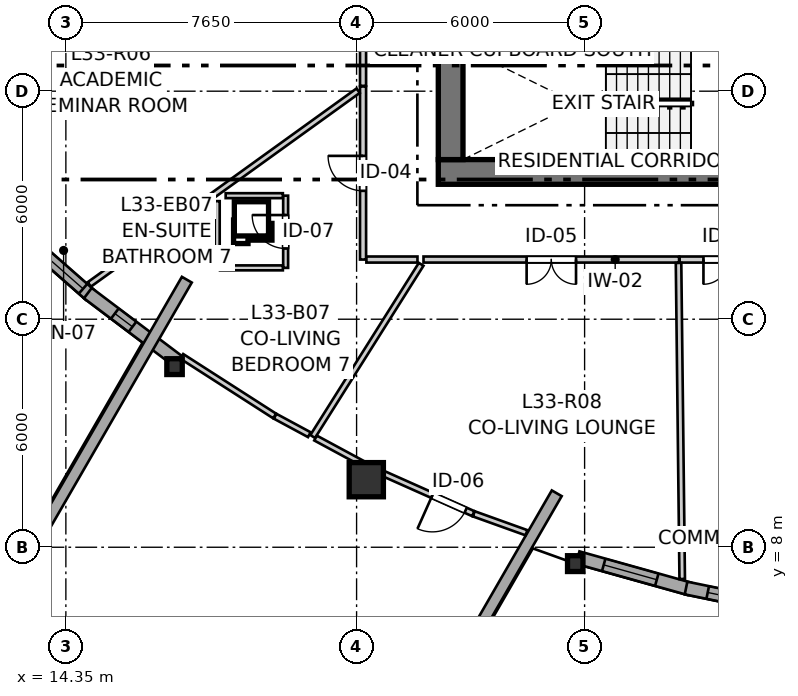
"""IFC4 building model, lengths in metres.
Left out: names, types, materials, properties, quantities, classifications, styles, units other than length and angle.
Written with IfcOpenShell. Run it as: python <this file> out.ifc"""

import sys

from ifc_helpers import new_model, si_unit, direction, frame, frame_2d, origin, origin_2d, place, context, subcontext, project, spatial, rectangle, i_section, extrude, source, transform, mapped, element, fill, save


model = new_model("IFC4")
c1 = context("Model", 3, precision=1e-05, world=origin(), true_north=direction((0.0, 1.0)))
c2 = subcontext(c1, "Body", "Model", "MODEL_VIEW")
j1 = project(units=[si_unit("LENGTHUNIT", "METRE"), si_unit("PLANEANGLEUNIT", "RADIAN")], contexts=[c1])
p1 = place(None, origin())
s1 = spatial("IfcSite", under=j1, at=p1, CompositionType="ELEMENT")
p2 = place(p1, origin())
s2 = spatial("IfcBuilding", under=s1, at=p2, CompositionType="ELEMENT")
p3 = place(p2, frame((0.0, 0.0, 112.0)))
s3 = spatial("IfcBuildingStorey", under=s2, at=p3, CompositionType="ELEMENT", Elevation=112.0)
p4 = place(p3, frame((24.15, 17.875, 0.0), z_axis=(0.0, 0.0, 1.0), x_axis=(1.0, 0.0, 0.0)))
e1 = element("IfcWall", 1, at=p4, inside=s3, PredefinedType="SHEAR", context=c2, shape_type="SweptSolid", body=[
    extrude(rectangle(XDim=12.4, YDim=0.65, at=frame_2d((6.2, 0.0))), origin(), (0.0, 0.0, 1.0), 2.935),
])
p5 = place(p3, frame((24.475, 33.8, 0.0), z_axis=(0.0, 0.0, 1.0), x_axis=(0.0, -1.0, 0.0)))
e2 = element("IfcWall", 2, at=p5, inside=s3, PredefinedType="SHEAR", context=c2, shape_type="SweptSolid", body=[
    extrude(rectangle(XDim=15.6, YDim=0.65, at=frame_2d((7.8, 0.0))), origin(), (0.0, 0.0, 1.0), 2.935),
])
p6 = place(p5, frame((7.05, 0.0, 0.0)))
e3 = element("IfcOpeningElement", 3, at=p6, cuts=e2, PredefinedType="OPENING", context=c2, shape_type="SweptSolid", body=[
    extrude(rectangle(XDim=1.5, YDim=2.15, at=frame_2d((0.75, 1.075))), frame((0.0, 0.335, 0.0), z_axis=(0.0, -1.0, 0.0), x_axis=(1.0, 0.0, 0.0)), (0.0, 0.0, 1.0), 0.67),
])
p7 = place(p5, frame((3.52, 0.0, 0.0)))
e4 = element("IfcOpeningElement", 4, at=p7, cuts=e2, PredefinedType="OPENING", context=c2, shape_type="SweptSolid", body=[
    extrude(rectangle(XDim=0.86, YDim=2.05, at=frame_2d((0.43, 1.025))), frame((0.0, 0.335, 0.0), z_axis=(0.0, -1.0, 0.0), x_axis=(1.0, 0.0, 0.0)), (0.0, 0.0, 1.0), 0.67),
])
p8 = place(p5, frame((11.22, 0.0, 0.0)))
e5 = element("IfcOpeningElement", 5, at=p8, cuts=e2, PredefinedType="OPENING", context=c2, shape_type="SweptSolid", body=[
    extrude(rectangle(XDim=0.86, YDim=2.05, at=frame_2d((0.43, 1.025))), frame((0.0, 0.335, 0.0), z_axis=(0.0, -1.0, 0.0), x_axis=(1.0, 0.0, 0.0)), (0.0, 0.0, 1.0), 0.67),
])
m1 = source(origin(), c2, "Body", "SweptSolid", [
    extrude(i_section(OverallWidth=0.406, OverallDepth=0.416, WebThickness=0.027, FlangeThickness=0.044, FilletRadius=0.015, at=origin_2d()), origin(), (0.0, 0.0, 1.0), 2.935),
])
p9 = place(p3, frame((17.209, 12.753, 0.0), z_axis=(0.0, 0.0, 1.0), x_axis=(1.0, 0.0, 0.0)))
e6 = element("IfcColumn", 6, at=p9, inside=s3, PredefinedType="PILASTER", context=c2, shape_type="MappedRepresentation", body=[
    mapped(m1, transform((0.0, 0.0, 0.0), x_axis=(1.0, 0.0, 0.0), y_axis=(0.0, 1.0, 0.0), z_axis=(0.0, 0.0, 1.0), scale=1.0)),
])
m2 = source(origin(), c2, "Body", "SweptSolid", [
    extrude(rectangle(XDim=0.9, YDim=0.9, at=origin_2d()), origin(), (0.0, 0.0, 1.0), 2.935),
])
p10 = place(p3, frame((22.256, 9.778, 0.0), z_axis=(0.0, 0.0, 1.0), x_axis=(1.0, 0.0, 0.0)))
e7 = element("IfcColumn", 7, at=p10, inside=s3, PredefinedType="COLUMN", context=c2, shape_type="MappedRepresentation", body=[
    mapped(m2, transform((0.0, 0.0, 0.0), x_axis=(1.0, 0.0, 0.0), y_axis=(0.0, 1.0, 0.0), z_axis=(0.0, 0.0, 1.0), scale=1.0)),
])
p11 = place(p3, frame((27.754, 7.569, 0.0), z_axis=(0.0, 0.0, 1.0), x_axis=(1.0, 0.0, 0.0)))
e8 = element("IfcColumn", 8, at=p11, inside=s3, PredefinedType="PILASTER", context=c2, shape_type="MappedRepresentation", body=[
    mapped(m1, transform((0.0, 0.0, 0.0), x_axis=(1.0, 0.0, 0.0), y_axis=(0.0, 1.0, 0.0), z_axis=(0.0, 0.0, 1.0), scale=1.0)),
])
p12 = place(p3, frame((12.901, 16.471, 0.0), z_axis=(0.0, 0.0, 1.0), x_axis=(0.751480442913, -0.659755366722, 0.0)))
e9 = element("IfcWall", 9, at=p12, inside=s3, PredefinedType="SOLIDWALL", context=c2, shape_type="SweptSolid", body=[
    extrude(rectangle(XDim=2.789, YDim=0.34, at=frame_2d((1.395, 0.0))), origin(), (0.0, 0.0, 1.0), 2.465),
])
p13 = place(p12, frame((0.43, 0.0, 0.82)))
e10 = element("IfcOpeningElement", 10, at=p13, cuts=e9, PredefinedType="OPENING", context=c2, shape_type="SweptSolid", body=[
    extrude(rectangle(XDim=2.1, YDim=1.4, at=frame_2d((1.05, 0.7))), frame((0.0, 0.18, 0.0), z_axis=(0.0, -1.0, 0.0), x_axis=(1.0, 0.0, 0.0)), (0.0, 0.0, 1.0), 0.36),
])
p14 = place(p3, frame((14.928, 14.686, 0.0), z_axis=(0.0, 0.0, 1.0), x_axis=(0.798387010211, -0.602144651995, 0.0)))
e11 = element("IfcWall", 11, at=p14, inside=s3, PredefinedType="SOLIDWALL", context=c2, shape_type="SweptSolid", body=[
    extrude(rectangle(XDim=2.966, YDim=0.34, at=frame_2d((1.483, 0.0))), origin(), (0.0, 0.0, 1.0), 2.465),
])
p15 = place(p14, frame((0.891, 0.0, 0.82)))
e12 = element("IfcOpeningElement", 12, at=p15, cuts=e11, PredefinedType="OPENING", context=c2, shape_type="SweptSolid", body=[
    extrude(rectangle(XDim=0.58, YDim=1.35, at=frame_2d((0.29, 0.675))), frame((0.0, 0.18, 0.0), z_axis=(0.0, -1.0, 0.0), x_axis=(1.0, 0.0, 0.0)), (0.0, 0.0, 1.0), 0.36),
])
p16 = place(p3, frame((27.819, 7.728, 0.0), z_axis=(0.0, 0.0, 1.0), x_axis=(0.963032186905, -0.269386352632, 0.0)))
e13 = element("IfcWall", 13, at=p16, inside=s3, PredefinedType="SOLIDWALL", context=c2, shape_type="SweptSolid", body=[
    extrude(rectangle(XDim=3.049, YDim=0.34, at=frame_2d((1.524, 0.0))), origin(), (0.0, 0.0, 1.0), 2.465),
])
p17 = place(p16, frame((0.71, 0.0, 0.82)))
e14 = element("IfcOpeningElement", 14, at=p17, cuts=e13, PredefinedType="OPENING", context=c2, shape_type="SweptSolid", body=[
    extrude(rectangle(XDim=1.45, YDim=1.25, at=frame_2d((0.725, 0.625))), frame((0.0, 0.18, 0.0), z_axis=(0.0, -1.0, 0.0), x_axis=(1.0, 0.0, 0.0)), (0.0, 0.0, 1.0), 0.36),
])
p18 = place(p3, frame((30.67, 6.927, 0.0), z_axis=(0.0, 0.0, 1.0), x_axis=(0.979422345081, -0.201821381317, 0.0)))
e15 = element("IfcWall", 15, at=p18, inside=s3, PredefinedType="SOLIDWALL", context=c2, shape_type="SweptSolid", body=[
    extrude(rectangle(XDim=2.903, YDim=0.34, at=frame_2d((1.452, 0.0))), origin(), (0.0, 0.0, 1.0), 2.465),
])
p19 = place(p18, frame((0.582, 0.0, 0.82)))
e16 = element("IfcOpeningElement", 16, at=p19, cuts=e15, PredefinedType="OPENING", context=c2, shape_type="SweptSolid", body=[
    extrude(rectangle(XDim=1.75, YDim=1.3, at=frame_2d((0.875, 0.65))), frame((0.0, 0.18, 0.0), z_axis=(0.0, -1.0, 0.0), x_axis=(1.0, 0.0, 0.0)), (0.0, 0.0, 1.0), 0.36),
])
p20 = place(p3, frame((27.267, 9.42, 0.0), z_axis=(0.0, 0.0, 1.0), x_axis=(-0.500001212782, -0.866024703583, 0.0)))
e17 = element("IfcWall", 17, at=p20, inside=s3, PredefinedType="SOLIDWALL", context=c2, shape_type="SweptSolid", body=[
    extrude(rectangle(XDim=20.09, YDim=0.3, at=frame_2d((10.045, 0.0))), origin(), (0.0, 0.0, 1.0), 2.115),
])
p21 = place(p3, frame((17.533, 15.04, 0.0), z_axis=(0.0, 0.0, 1.0), x_axis=(-0.499995950774, -0.866027741594, 0.0)))
e18 = element("IfcWall", 18, at=p21, inside=s3, PredefinedType="SOLIDWALL", context=c2, shape_type="SweptSolid", body=[
    extrude(rectangle(XDim=20.091, YDim=0.3, at=frame_2d((10.045, 0.0))), origin(), (0.0, 0.0, 1.0), 2.115),
])
p22 = place(p3, frame((30.486, 15.57, 0.0), z_axis=(0.0, 0.0, 1.0), x_axis=(-1.0, 0.0, 0.0)))
e19 = element("IfcWall", 19, at=p22, inside=s3, PredefinedType="PARTITIONING", context=c2, shape_type="SweptSolid", body=[
    extrude(rectangle(XDim=6.725, YDim=0.16, at=frame_2d((3.363, 0.0))), origin(), (0.0, 0.0, 1.0), 2.935),
])
p23 = place(p22, frame((2.711, 0.0, 0.0)))
e20 = element("IfcOpeningElement", 20, at=p23, cuts=e19, PredefinedType="OPENING", context=c2, shape_type="SweptSolid", body=[
    extrude(rectangle(XDim=1.3, YDim=2.1, at=frame_2d((0.65, 1.05))), frame((0.0, 0.09, 0.0), z_axis=(0.0, -1.0, 0.0), x_axis=(1.0, 0.0, 0.0)), (0.0, 0.0, 1.0), 0.18),
])
p24 = place(p3, frame((22.17, 15.57, 0.0), z_axis=(0.0, 0.0, 1.0), x_axis=(0.0, 1.0, 0.0)))
e21 = element("IfcWall", 21, at=p24, inside=s3, PredefinedType="PARTITIONING", context=c2, shape_type="SweptSolid", body=[
    extrude(rectangle(XDim=4.555, YDim=0.16, at=frame_2d((2.277, 0.0))), origin(), (0.0, 0.0, 1.0), 2.935),
])
p25 = place(p24, frame((1.808, 0.0, 0.0)))
e22 = element("IfcOpeningElement", 22, at=p25, cuts=e21, PredefinedType="OPENING", context=c2, shape_type="SweptSolid", body=[
    extrude(rectangle(XDim=0.92, YDim=2.1, at=frame_2d((0.46, 1.05))), frame((0.0, 0.09, 0.0), z_axis=(0.0, -1.0, 0.0), x_axis=(1.0, 0.0, 0.0)), (0.0, 0.0, 1.0), 0.18),
])
p26 = place(p3, frame((22.17, 20.14, 0.0), z_axis=(0.0, 0.0, 1.0), x_axis=(0.0, 1.0, 0.0)))
e23 = element("IfcWall", 23, at=p26, inside=s3, PredefinedType="PARTITIONING", context=c2, shape_type="SweptSolid", body=[
    extrude(rectangle(XDim=4.01, YDim=0.16, at=frame_2d((2.005, 0.0))), origin(), (0.0, 0.0, 1.0), 2.935),
])
p27 = place(p26, frame((1.375, 0.0, 0.0)))
e24 = element("IfcOpeningElement", 24, at=p27, cuts=e23, PredefinedType="OPENING", context=c2, shape_type="SweptSolid", body=[
    extrude(rectangle(XDim=1.3, YDim=2.1, at=frame_2d((0.65, 1.05))), frame((0.0, 0.09, 0.0), z_axis=(0.0, -1.0, 0.0), x_axis=(1.0, 0.0, 0.0)), (0.0, 0.0, 1.0), 0.18),
])
p28 = place(p3, frame((25.071, 8.884, 0.0), z_axis=(0.0, 0.0, 1.0), x_axis=(-0.913404708383, 0.407052623997, 0.0)))
e25 = element("IfcWall", 25, at=p28, inside=s3, PredefinedType="PARTITIONING", context=c2, shape_type="SweptSolid", body=[
    extrude(rectangle(XDim=2.923, YDim=0.145, at=frame_2d((1.462, 0.0))), origin(), (0.0, 0.0, 1.0), 2.453),
])
p29 = place(p28, frame((0.22, 0.0, 0.0)))
e26 = element("IfcOpeningElement", 26, at=p29, cuts=e25, PredefinedType="OPENING", context=c2, shape_type="SweptSolid", body=[
    extrude(rectangle(XDim=0.96, YDim=2.1, at=frame_2d((0.48, 1.05))), frame((0.0, 0.083, 0.0), z_axis=(0.0, -1.0, 0.0), x_axis=(1.0, 0.0, 0.0)), (0.0, 0.0, 1.0), 0.165),
])
p30 = place(p3, frame((33.099, 15.57, 0.0), z_axis=(0.0, 0.0, 1.0), x_axis=(-1.0, 0.0, 0.0)))
e27 = element("IfcWall", 27, at=p30, inside=s3, PredefinedType="PARTITIONING", context=c2, shape_type="SweptSolid", body=[
    extrude(rectangle(XDim=2.598, YDim=0.16, at=frame_2d((1.299, 0.0))), origin(), (0.0, 0.0, 1.0), 2.935),
])
p31 = place(p30, frame((0.671, 0.0, 0.0)))
e28 = element("IfcOpeningElement", 28, at=p31, cuts=e27, PredefinedType="OPENING", context=c2, shape_type="SweptSolid", body=[
    extrude(rectangle(XDim=1.3, YDim=2.1, at=frame_2d((0.65, 1.05))), frame((0.0, 0.09, 0.0), z_axis=(0.0, -1.0, 0.0), x_axis=(1.0, 0.0, 0.0)), (0.0, 0.0, 1.0), 0.18),
])
p32 = place(p3, frame((20.133, 15.351, 0.0), z_axis=(0.0, 0.0, 1.0), x_axis=(0.0, 1.0, 0.0)))
e29 = element("IfcWall", 29, at=p32, inside=s3, PredefinedType="PARTITIONING", context=c2, shape_type="SweptSolid", body=[
    extrude(rectangle(XDim=1.9, YDim=0.13, at=frame_2d((0.95, 0.0))), origin(), (0.0, 0.0, 1.0), 2.935),
])
p33 = place(p32, frame((0.51, 0.0, 0.0)))
e30 = element("IfcOpeningElement", 30, at=p33, cuts=e29, PredefinedType="OPENING", context=c2, shape_type="SweptSolid", body=[
    extrude(rectangle(XDim=0.88, YDim=2.05, at=frame_2d((0.44, 1.025))), frame((0.0, 0.075, 0.0), z_axis=(0.0, -1.0, 0.0), x_axis=(1.0, 0.0, 0.0)), (0.0, 0.0, 1.0), 0.15),
])
p34 = place(p3, frame((14.966, 14.915, 0.0), z_axis=(0.0, 0.0, 1.0), x_axis=(0.811310715309, 0.584615192434, 0.0)))
e31 = element("IfcWall", 31, at=p34, inside=s3, PredefinedType="PARTITIONING", context=c2, shape_type="SweptSolid", body=[
    extrude(rectangle(XDim=8.72, YDim=0.145, at=frame_2d((4.36, 0.0))), origin(), (0.0, 0.0, 1.0), 2.103),
])
p35 = place(p3, frame((30.472, 15.481, 0.0), z_axis=(0.0, 0.0, 1.0), x_axis=(0.011623708307, -0.999932442421, 0.0)))
e32 = element("IfcWall", 32, at=p35, inside=s3, PredefinedType="PARTITIONING", context=c2, shape_type="SweptSolid", body=[
    extrude(rectangle(XDim=8.317, YDim=0.145, at=frame_2d((4.159, 0.0))), origin(), (0.0, 0.0, 1.0), 2.935),
])
p36 = place(p3, frame((20.845, 10.914, 0.0), z_axis=(0.0, 0.0, 1.0), x_axis=(0.533007953382, 0.846110230189, 0.0)))
e33 = element("IfcWall", 33, at=p36, inside=s3, PredefinedType="PARTITIONING", context=c2, shape_type="SweptSolid", body=[
    extrude(rectangle(XDim=5.354, YDim=0.145, at=frame_2d((2.677, 0.0))), origin(), (0.0, 0.0, 1.0), 2.935),
])
p37 = place(p3, frame((17.398, 13.024, 0.0), z_axis=(0.0, 0.0, 1.0), x_axis=(0.841590343852, -0.540116369994, 0.0)))
e34 = element("IfcWall", 34, at=p37, inside=s3, PredefinedType="PARTITIONING", context=c2, shape_type="SweptSolid", body=[
    extrude(rectangle(XDim=2.906, YDim=0.145, at=frame_2d((1.453, 0.0))), origin(), (0.0, 0.0, 1.0), 2.453),
])
p38 = place(p3, frame((18.333, 15.351, 0.0), z_axis=(0.0, 0.0, 1.0), x_axis=(0.0, 1.0, 0.0)))
e35 = element("IfcWall", 35, at=p38, inside=s3, PredefinedType="PARTITIONING", context=c2, shape_type="SweptSolid", body=[
    extrude(rectangle(XDim=1.756, YDim=0.13, at=frame_2d((0.878, 0.0))), origin(), (0.0, 0.0, 1.0), 2.935),
])
p39 = place(p3, frame((18.555, 17.251, 0.0), z_axis=(0.0, 0.0, 1.0), x_axis=(1.0, 0.0, 0.0)))
e36 = element("IfcWall", 36, at=p39, inside=s3, PredefinedType="PARTITIONING", context=c2, shape_type="SweptSolid", body=[
    extrude(rectangle(XDim=1.505, YDim=0.13, at=frame_2d((0.752, 0.0))), origin(), (0.0, 0.0, 1.0), 2.935),
])
p40 = place(p3, frame((18.406, 15.351, 0.0), z_axis=(0.0, 0.0, 1.0), x_axis=(1.0, 0.0, 0.0)))
e37 = element("IfcWall", 37, at=p40, inside=s3, PredefinedType="PARTITIONING", context=c2, shape_type="SweptSolid", body=[
    extrude(rectangle(XDim=1.654, YDim=0.13, at=frame_2d((0.827, 0.0))), origin(), (0.0, 0.0, 1.0), 2.935),
])
p41 = place(p3, frame((20.92, 10.873, 0.0), z_axis=(0.0, 0.0, 1.0), x_axis=(0.879929881444, -0.475103571595, 0.0)))
e38 = element("IfcWall", 38, at=p41, inside=s3, PredefinedType="PARTITIONING", context=c2, shape_type="SweptSolid", body=[
    extrude(rectangle(XDim=1.667, YDim=0.145, at=frame_2d((0.834, 0.0))), origin(), (0.0, 0.0, 1.0), 2.453),
])
p42 = place(p3, frame((22.258, 15.57, 0.0), z_axis=(0.0, 0.0, 1.0), x_axis=(1.0, 0.0, 0.0)))
e39 = element("IfcWall", 39, at=p42, inside=s3, PredefinedType="PARTITIONING", context=c2, shape_type="SweptSolid", body=[
    extrude(rectangle(XDim=1.344, YDim=0.16, at=frame_2d((0.672, 0.0))), origin(), (0.0, 0.0, 1.0), 2.935),
])
p43 = place(p3, frame((25.085, 8.879, 0.0), z_axis=(0.0, 0.0, 1.0), x_axis=(0.941166260093, -0.337943887151, 0.0)))
e40 = element("IfcWall", 40, at=p43, inside=s3, PredefinedType="PARTITIONING", context=c2, shape_type="SweptSolid", body=[
    extrude(rectangle(XDim=1.472, YDim=0.145, at=frame_2d((0.736, 0.0))), origin(), (0.0, 0.0, 1.0), 2.453),
])
p44 = place(p3, frame((19.857, 11.447, 0.0), z_axis=(0.0, 0.0, 1.0), x_axis=(0.8800411893, -0.474897362738, 0.0)))
e41 = element("IfcWall", 41, at=p44, inside=s3, PredefinedType="PARTITIONING", context=c2, shape_type="SweptSolid", body=[
    extrude(rectangle(XDim=1.022, YDim=0.145, at=frame_2d((0.511, 0.0))), origin(), (0.0, 0.0, 1.0), 2.453),
])
m3 = source(origin(), c2, "Body", "SweptSolid", [
    extrude(rectangle(XDim=2.1, YDim=1.4, at=frame_2d((1.05, 0.7))), frame((0.0, 0.03, 0.0), z_axis=(0.0, -1.0, 0.0), x_axis=(1.0, 0.0, 0.0)), (0.0, 0.0, 1.0), 0.06),
])
p45 = place(p13, origin())
e42 = element("IfcWindow", 42, at=p45, inside=s3, PartitioningType="SINGLE_PANEL", PredefinedType="WINDOW", context=c2, shape_type="MappedRepresentation", body=[
    mapped(m3, transform((0.0, 0.0, 0.0), x_axis=(1.0, 0.0, 0.0), y_axis=(0.0, 1.0, 0.0), z_axis=(0.0, 0.0, 1.0), scale=1.0)),
])
fill(e10, e42)
m4 = source(origin(), c2, "Body", "SweptSolid", [
    extrude(rectangle(XDim=1.45, YDim=1.25, at=frame_2d((0.725, 0.625))), frame((0.0, 0.03, 0.0), z_axis=(0.0, -1.0, 0.0), x_axis=(1.0, 0.0, 0.0)), (0.0, 0.0, 1.0), 0.06),
])
p46 = place(p17, origin())
e43 = element("IfcWindow", 43, at=p46, inside=s3, PartitioningType="SINGLE_PANEL", PredefinedType="WINDOW", context=c2, shape_type="MappedRepresentation", body=[
    mapped(m4, transform((0.0, 0.0, 0.0), x_axis=(1.0, 0.0, 0.0), y_axis=(0.0, 1.0, 0.0), z_axis=(0.0, 0.0, 1.0), scale=1.0)),
])
fill(e14, e43)
m5 = source(origin(), c2, "Body", "SweptSolid", [
    extrude(rectangle(XDim=1.75, YDim=1.3, at=frame_2d((0.875, 0.65))), frame((0.0, 0.03, 0.0), z_axis=(0.0, -1.0, 0.0), x_axis=(1.0, 0.0, 0.0)), (0.0, 0.0, 1.0), 0.06),
])
p47 = place(p19, origin())
e44 = element("IfcWindow", 44, at=p47, inside=s3, PartitioningType="SINGLE_PANEL", PredefinedType="WINDOW", context=c2, shape_type="MappedRepresentation", body=[
    mapped(m5, transform((0.0, 0.0, 0.0), x_axis=(1.0, 0.0, 0.0), y_axis=(0.0, 1.0, 0.0), z_axis=(0.0, 0.0, 1.0), scale=1.0)),
])
fill(e16, e44)
m6 = source(origin(), c2, "Body", "SweptSolid", [
    extrude(rectangle(XDim=0.58, YDim=1.35, at=frame_2d((0.29, 0.675))), frame((0.0, 0.03, 0.0), z_axis=(0.0, -1.0, 0.0), x_axis=(1.0, 0.0, 0.0)), (0.0, 0.0, 1.0), 0.06),
])
p48 = place(p15, origin())
e45 = element("IfcWindow", 45, at=p48, inside=s3, PartitioningType="SINGLE_PANEL", PredefinedType="WINDOW", context=c2, shape_type="MappedRepresentation", body=[
    mapped(m6, transform((0.0, 0.0, 0.0), x_axis=(1.0, 0.0, 0.0), y_axis=(0.0, 1.0, 0.0), z_axis=(0.0, 0.0, 1.0), scale=1.0)),
])
fill(e12, e45)
m7 = source(origin(), c2, "Body", "SweptSolid", [
    extrude(rectangle(XDim=1.3, YDim=2.1, at=frame_2d((0.65, 1.05))), frame((0.0, 0.025, 0.0), z_axis=(0.0, -1.0, 0.0), x_axis=(1.0, 0.0, 0.0)), (0.0, 0.0, 1.0), 0.05),
])
p49 = place(p23, origin())
e46 = element("IfcDoor", 46, at=p49, inside=s3, OperationType="DOUBLE_DOOR_SINGLE_SWING", PredefinedType="DOOR", context=c2, shape_type="MappedRepresentation", body=[
    mapped(m7, transform((0.0, 0.0, 0.0), x_axis=(1.0, 0.0, 0.0), y_axis=(0.0, 1.0, 0.0), z_axis=(0.0, 0.0, 1.0), scale=1.0)),
])
fill(e20, e46)
m8 = source(origin(), c2, "Body", "SweptSolid", [
    extrude(rectangle(XDim=0.92, YDim=2.1, at=frame_2d((0.46, 1.05))), frame((0.0, 0.025, 0.0), z_axis=(0.0, -1.0, 0.0), x_axis=(1.0, 0.0, 0.0)), (0.0, 0.0, 1.0), 0.05),
])
p50 = place(p25, origin())
e47 = element("IfcDoor", 47, at=p50, inside=s3, OperationType="SINGLE_SWING_RIGHT", PredefinedType="DOOR", context=c2, shape_type="MappedRepresentation", body=[
    mapped(m8, transform((0.0, 0.0, 0.0), x_axis=(1.0, 0.0, 0.0), y_axis=(0.0, 1.0, 0.0), z_axis=(0.0, 0.0, 1.0), scale=1.0)),
])
fill(e22, e47)
m9 = source(origin(), c2, "Body", "SweptSolid", [
    extrude(rectangle(XDim=0.96, YDim=2.1, at=frame_2d((0.48, 1.05))), frame((0.0, 0.025, 0.0), z_axis=(0.0, -1.0, 0.0), x_axis=(1.0, 0.0, 0.0)), (0.0, 0.0, 1.0), 0.05),
])
p51 = place(p29, origin())
e48 = element("IfcDoor", 48, at=p51, inside=s3, OperationType="SINGLE_SWING_RIGHT", PredefinedType="DOOR", context=c2, shape_type="MappedRepresentation", body=[
    mapped(m9, transform((0.0, 0.0, 0.0), x_axis=(1.0, 0.0, 0.0), y_axis=(0.0, 1.0, 0.0), z_axis=(0.0, 0.0, 1.0), scale=1.0)),
])
fill(e26, e48)
p52 = place(p31, origin())
e49 = element("IfcDoor", 49, at=p52, inside=s3, OperationType="DOUBLE_DOOR_SINGLE_SWING", PredefinedType="DOOR", context=c2, shape_type="MappedRepresentation", body=[
    mapped(m7, transform((0.0, 0.0, 0.0), x_axis=(1.0, 0.0, 0.0), y_axis=(0.0, 1.0, 0.0), z_axis=(0.0, 0.0, 1.0), scale=1.0)),
])
fill(e28, e49)
m10 = source(origin(), c2, "Body", "SweptSolid", [
    extrude(rectangle(XDim=0.88, YDim=2.05, at=frame_2d((0.44, 1.025))), frame((0.0, 0.025, 0.0), z_axis=(0.0, -1.0, 0.0), x_axis=(1.0, 0.0, 0.0)), (0.0, 0.0, 1.0), 0.05),
])
p53 = place(p33, origin())
e50 = element("IfcDoor", 50, at=p53, inside=s3, OperationType="SINGLE_SWING_RIGHT", PredefinedType="DOOR", context=c2, shape_type="MappedRepresentation", body=[
    mapped(m10, transform((0.0, 0.0, 0.0), x_axis=(1.0, 0.0, 0.0), y_axis=(0.0, 1.0, 0.0), z_axis=(0.0, 0.0, 1.0), scale=1.0)),
])
fill(e30, e50)
save(model, sys.argv[1])
